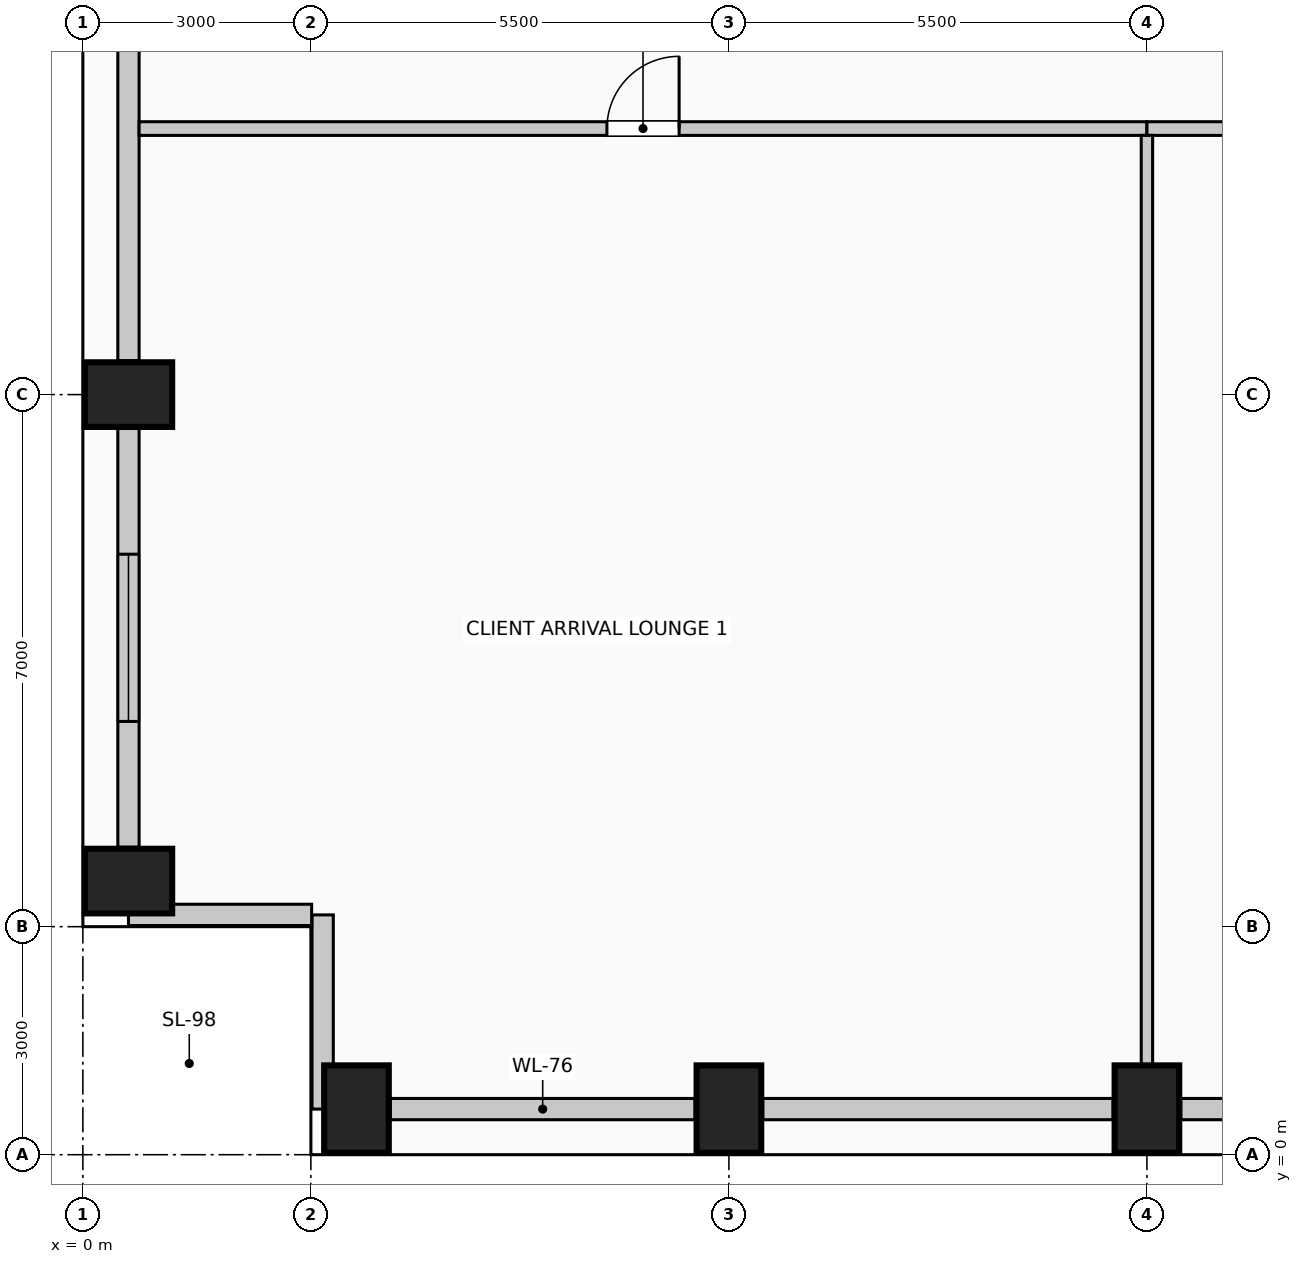
"""IFC4 building model, lengths in metres.
Left out: names, types, materials, properties, quantities, classifications, styles, units other than length and angle.
Written with IfcOpenShell. Run it as: python <this file> out.ifc"""

import sys

from ifc_helpers import new_model, si_unit, direction, frame, frame_2d, origin, origin_2d, place, context, subcontext, project, spatial, rectangle, extrude, element, fill, save


model = new_model("IFC4")
c1 = context("Model", 3, precision=1e-05, world=origin(), true_north=direction((0.0, 1.0)))
c2 = subcontext(c1, "Body", "Model", "MODEL_VIEW")
j1 = project(units=[si_unit("LENGTHUNIT", "METRE"), si_unit("PLANEANGLEUNIT", "RADIAN")], contexts=[c1])
p1 = place(None, origin())
s1 = spatial("IfcSite", under=j1, at=p1, CompositionType="ELEMENT")
p2 = place(p1, origin())
s2 = spatial("IfcBuilding", under=s1, at=p2, CompositionType="ELEMENT")
p3 = place(p2, frame((0.0, 0.0, 116.6)))
s3 = spatial("IfcBuildingStorey", under=s2, at=p3, CompositionType="ELEMENT", Elevation=116.6)
for number, where, z_axis, x_axis in (
    (1, (3.6, 0.6, 0.0), (0.0, 0.0, 1.0), (1.0, 0.0, 0.0)),
    (2, (8.5, 0.6, 0.0), (0.0, 0.0, 1.0), (1.0, 0.0, 0.0)),
    (3, (14.0, 0.6, 0.0), (0.0, 0.0, 1.0), (1.0, 0.0, 0.0)),
    (4, (0.6, 3.6, 0.0), (0.0, 0.0, 1.0), (0.0, 1.0, 0.0)),
    (5, (0.6, 10.0, 0.0), (0.0, 0.0, 1.0), (0.0, 1.0, 0.0)),
):
    element("IfcColumn", number, at=place(p3, frame(where, z_axis=z_axis, x_axis=x_axis)), inside=s3, PredefinedType="COLUMN", context=c2, shape_type="SweptSolid", body=[
        extrude(rectangle(XDim=0.85, YDim=1.15, at=origin_2d()), origin(), (0.0, 0.0, 1.0), 4.0),
    ])
p4 = place(p3, frame((8.055, 0.6, 0.0), z_axis=(0.0, 0.0, 1.0), x_axis=(-1.0, 0.0, 0.0)))
e6 = element("IfcWall", 6, at=p4, inside=s3, PredefinedType="SOLIDWALL", context=c2, shape_type="SweptSolid", body=[
    extrude(rectangle(XDim=4.01, YDim=0.28, at=frame_2d((2.005, 0.0))), origin(), (0.0, 0.0, 1.0), 2.875),
])
p5 = place(p3, frame((13.555, 0.6, 0.0), z_axis=(0.0, 0.0, 1.0), x_axis=(-1.0, 0.0, 0.0)))
e7 = element("IfcWall", 7, at=p5, inside=s3, PredefinedType="SOLIDWALL", context=c2, shape_type="SweptSolid", body=[
    extrude(rectangle(XDim=4.61, YDim=0.28, at=frame_2d((2.305, 0.0))), origin(), (0.0, 0.0, 1.0), 2.875),
])
p6 = place(p3, frame((15.83, 0.6, 0.0), z_axis=(0.0, 0.0, 1.0), x_axis=(-1.0, 0.0, 0.0)))
e8 = element("IfcWall", 8, at=p6, inside=s3, PredefinedType="SOLIDWALL", context=c2, shape_type="SweptSolid", body=[
    extrude(rectangle(XDim=1.385, YDim=0.28, at=frame_2d((0.692, 0.0))), origin(), (0.0, 0.0, 1.0), 2.875),
])
p7 = place(p3, frame((0.6, 4.045, 0.0), z_axis=(0.0, 0.0, 1.0), x_axis=(0.0, 1.0, 0.0)))
e9 = element("IfcWall", 9, at=p7, inside=s3, PredefinedType="SOLIDWALL", context=c2, shape_type="SweptSolid", body=[
    extrude(rectangle(XDim=5.51, YDim=0.28, at=frame_2d((2.755, 0.0))), origin(), (0.0, 0.0, 1.0), 2.875),
])
p8 = place(p7, frame((1.655, 0.0, 0.5)))
e10 = element("IfcOpeningElement", 10, at=p8, cuts=e9, PredefinedType="OPENING", context=c2, shape_type="SweptSolid", body=[
    extrude(rectangle(XDim=2.2, YDim=1.95, at=frame_2d((1.1, 0.975))), frame((0.0, 0.15, 0.0), z_axis=(0.0, -1.0, 0.0), x_axis=(1.0, 0.0, 0.0)), (0.0, 0.0, 1.0), 0.3),
])
p9 = place(p3, frame((0.6, 10.445, 0.0), z_axis=(0.0, 0.0, 1.0), x_axis=(0.0, 1.0, 0.0)))
e11 = element("IfcWall", 11, at=p9, inside=s3, PredefinedType="SOLIDWALL", context=c2, shape_type="SweptSolid", body=[
    extrude(rectangle(XDim=7.11, YDim=0.28, at=frame_2d((3.555, 0.0))), origin(), (0.0, 0.0, 1.0), 2.875),
])
p10 = place(p3, frame((3.155, 0.6, 0.0), z_axis=(0.0, 0.0, 1.0), x_axis=(0.0, 1.0, 0.0)))
e12 = element("IfcWall", 12, at=p10, inside=s3, PredefinedType="SOLIDWALL", context=c2, shape_type="SweptSolid", body=[
    extrude(rectangle(XDim=2.555, YDim=0.28, at=frame_2d((1.277, 0.0))), origin(), (0.0, 0.0, 1.0), 3.725),
])
p11 = place(p3, frame((3.01, 3.155, 0.0), z_axis=(0.0, 0.0, 1.0), x_axis=(-1.0, 0.0, 0.0)))
e13 = element("IfcWall", 13, at=p11, inside=s3, PredefinedType="SOLIDWALL", context=c2, shape_type="SweptSolid", body=[
    extrude(rectangle(XDim=2.41, YDim=0.28, at=frame_2d((1.205, 0.0))), origin(), (0.0, 0.0, 1.0), 3.725),
])
p12 = place(p3, frame((0.74, 13.5, 0.0), z_axis=(0.0, 0.0, 1.0), x_axis=(1.0, 0.0, 0.0)))
e14 = element("IfcWall", 14, at=p12, inside=s3, PredefinedType="PARTITIONING", context=c2, shape_type="SweptSolid", body=[
    extrude(rectangle(XDim=13.26, YDim=0.18, at=frame_2d((6.63, 0.0))), origin(), (0.0, 0.0, 1.0), 3.725),
])
p13 = place(p12, frame((6.155, 0.0, 0.0)))
e15 = element("IfcOpeningElement", 15, at=p13, cuts=e14, PredefinedType="OPENING", context=c2, shape_type="SweptSolid", body=[
    extrude(rectangle(XDim=0.95, YDim=2.15, at=frame_2d((0.475, 1.075))), frame((0.0, 0.1, 0.0), z_axis=(0.0, -1.0, 0.0), x_axis=(1.0, 0.0, 0.0)), (0.0, 0.0, 1.0), 0.2),
])
p14 = place(p3, frame((14.0, 13.5, 0.0), z_axis=(0.0, 0.0, 1.0), x_axis=(1.0, 0.0, 0.0)))
e16 = element("IfcWall", 16, at=p14, inside=s3, PredefinedType="PARTITIONING", context=c2, shape_type="SweptSolid", body=[
    extrude(rectangle(XDim=12.12, YDim=0.18, at=frame_2d((6.06, 0.0))), origin(), (0.0, 0.0, 1.0), 3.725),
])
p15 = place(p14, frame((5.535, 0.0, 0.0)))
e17 = element("IfcOpeningElement", 17, at=p15, cuts=e16, PredefinedType="OPENING", context=c2, shape_type="SweptSolid", body=[
    extrude(rectangle(XDim=1.05, YDim=2.15, at=frame_2d((0.525, 1.075))), frame((0.0, 0.1, 0.0), z_axis=(0.0, -1.0, 0.0), x_axis=(1.0, 0.0, 0.0)), (0.0, 0.0, 1.0), 0.2),
])
p16 = place(p3, frame((14.0, 1.175, 0.0), z_axis=(0.0, 0.0, 1.0), x_axis=(0.0, 1.0, 0.0)))
e18 = element("IfcWall", 18, at=p16, inside=s3, PredefinedType="PARTITIONING", context=c2, shape_type="SweptSolid", body=[
    extrude(rectangle(XDim=12.235, YDim=0.15, at=frame_2d((6.117, 0.0))), origin(), (0.0, 0.0, 1.0), 3.725),
])
p17 = place(p8, origin())
e19 = element("IfcWindow", 19, at=p17, inside=s3, PartitioningType="SINGLE_PANEL", PredefinedType="WINDOW", context=c2, shape_type="SweptSolid", body=[
    extrude(rectangle(XDim=2.2, YDim=1.95, at=frame_2d((1.1, 0.975))), frame((0.0, 0.03, 0.0), z_axis=(0.0, -1.0, 0.0), x_axis=(1.0, 0.0, 0.0)), (0.0, 0.0, 1.0), 0.06),
])
fill(e10, e19)
p18 = place(p13, origin())
e20 = element("IfcDoor", 20, at=p18, inside=s3, OperationType="SINGLE_SWING_RIGHT", PredefinedType="DOOR", context=c2, shape_type="SweptSolid", body=[
    extrude(rectangle(XDim=0.95, YDim=2.15, at=frame_2d((0.475, 1.075))), frame((0.0, 0.025, 0.0), z_axis=(0.0, -1.0, 0.0), x_axis=(1.0, 0.0, 0.0)), (0.0, 0.0, 1.0), 0.05),
])
fill(e15, e20)
save(model, sys.argv[1])
